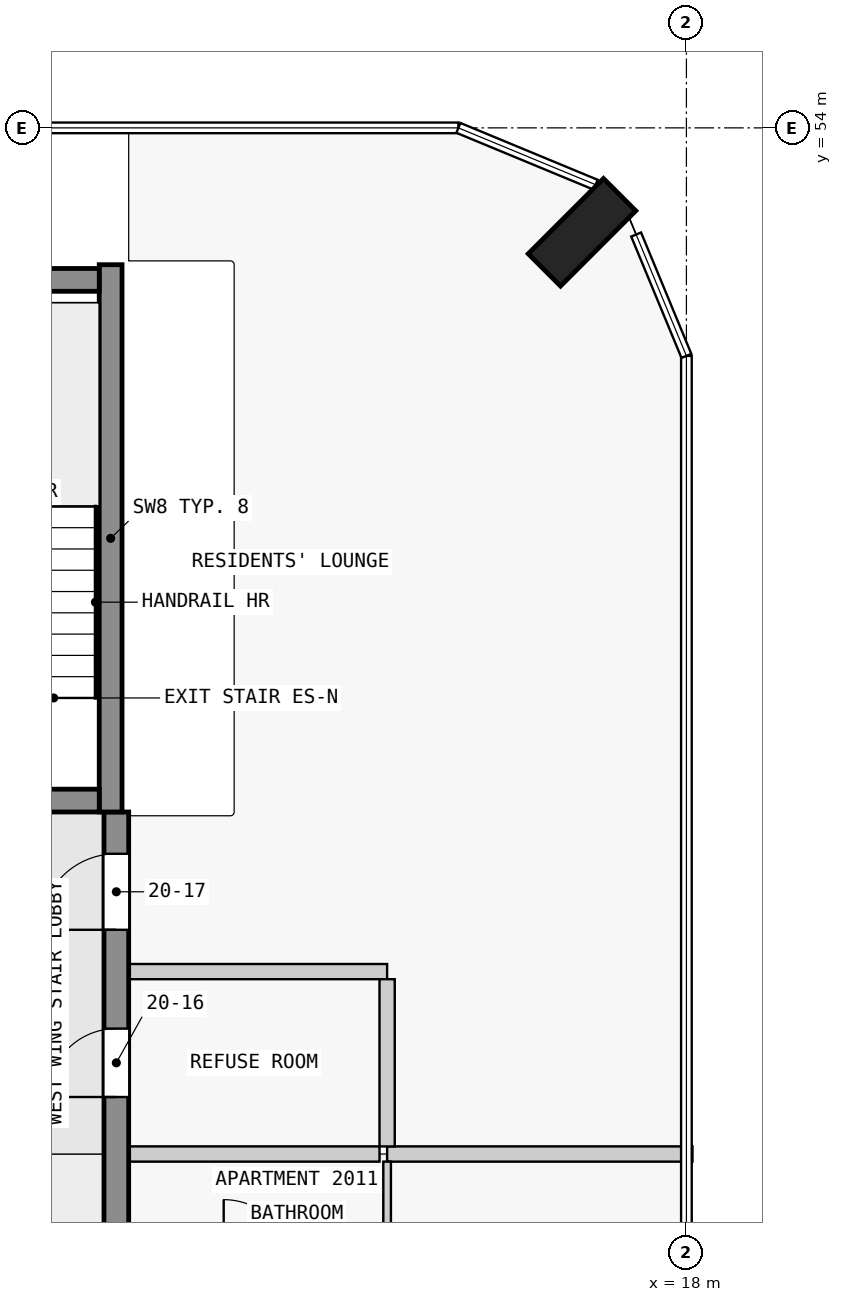
"""IFC4 building model, lengths in metres.
Left out: names, types, materials, properties, quantities, classifications, styles, units other than length and angle.
Written with IfcOpenShell. Run it as: python <this file> out.ifc"""

import sys

from ifc_helpers import new_model, si_unit, direction, frame, frame_2d, origin, origin_2d, place, context, subcontext, project, spatial, rectangle, extrude, element, fill, save


model = new_model("IFC4")
c1 = context("Model", 3, precision=1e-05, world=origin(), true_north=direction((0.0, 1.0)))
c2 = subcontext(c1, "Body", "Model", "MODEL_VIEW")
j1 = project(units=[si_unit("LENGTHUNIT", "METRE"), si_unit("PLANEANGLEUNIT", "RADIAN")], contexts=[c1])
p1 = place(None, origin())
s1 = spatial("IfcSite", under=j1, at=p1, CompositionType="ELEMENT")
p2 = place(p1, origin())
s2 = spatial("IfcBuilding", under=s1, at=p2, CompositionType="ELEMENT")
p3 = place(p2, frame((0.0, 0.0, 81.8)))
s3 = spatial("IfcBuildingStorey", under=s2, at=p3, CompositionType="ELEMENT", Elevation=81.8)
p4 = place(p3, frame((16.626, 52.626, 0.0), z_axis=(0.0, 0.0, 1.0), x_axis=(-0.707106781187, 0.707106781187, 0.0)))
e1 = element("IfcColumn", 1, at=p4, inside=s3, PredefinedType="COLUMN", context=c2, shape_type="SweptSolid", body=[
    extrude(rectangle(XDim=0.6, YDim=1.4, at=origin_2d()), origin(), (0.0, 0.0, 1.0), 3.5),
])
p5 = place(p3, frame((7.725, 45.15, 0.0), z_axis=(0.0, 0.0, 1.0), x_axis=(1.0, 0.0, 0.0)))
e2 = element("IfcWall", 2, at=p5, inside=s3, PredefinedType="SHEAR", context=c2, shape_type="SweptSolid", body=[
    extrude(rectangle(XDim=2.55, YDim=0.3, at=frame_2d((1.275, 0.0))), origin(), (0.0, 0.0, 1.0), 3.5),
])
p6 = place(p5, frame((0.725, 0.0, 0.0)))
e3 = element("IfcOpeningElement", 3, at=p6, cuts=e2, PredefinedType="OPENING", context=c2, shape_type="SweptSolid", body=[
    extrude(rectangle(XDim=1.1, YDim=2.1, at=frame_2d((0.55, 1.05))), frame((0.0, 0.16, 0.0), z_axis=(0.0, -1.0, 0.0), x_axis=(1.0, 0.0, 0.0)), (0.0, 0.0, 1.0), 0.32),
])
p7 = place(p3, frame((7.725, 52.0, 0.0), z_axis=(0.0, 0.0, 1.0), x_axis=(1.0, 0.0, 0.0)))
e4 = element("IfcWall", 4, at=p7, inside=s3, PredefinedType="SHEAR", context=c2, shape_type="SweptSolid", body=[
    extrude(rectangle(XDim=2.55, YDim=0.3, at=frame_2d((1.275, 0.0))), origin(), (0.0, 0.0, 1.0), 3.5),
])
p8 = place(p3, frame((10.425, 45.0, 0.0), z_axis=(0.0, 0.0, 1.0), x_axis=(0.0, 1.0, 0.0)))
e5 = element("IfcWall", 5, at=p8, inside=s3, PredefinedType="SHEAR", context=c2, shape_type="SweptSolid", body=[
    extrude(rectangle(XDim=7.2, YDim=0.3, at=frame_2d((3.6, 0.0))), origin(), (0.0, 0.0, 1.0), 3.5),
])
p9 = place(p3, frame((10.5, 18.0, 0.0), z_axis=(0.0, 0.0, 1.0), x_axis=(0.0, 1.0, 0.0)))
e6 = element("IfcWall", 6, at=p9, inside=s3, PredefinedType="SHEAR", context=c2, shape_type="SweptSolid", body=[
    extrude(rectangle(XDim=27.0, YDim=0.325, at=frame_2d((13.5, 0.0))), origin(), (0.0, 0.0, 1.0), 3.25),
])
p10 = place(p9, frame((4.05, 0.0, 0.0)))
e7 = element("IfcOpeningElement", 7, at=p10, cuts=e6, PredefinedType="OPENING", context=c2, shape_type="SweptSolid", body=[
    extrude(rectangle(XDim=1.0, YDim=2.1, at=frame_2d((0.5, 1.05))), frame((0.0, 0.172, 0.0), z_axis=(0.0, -1.0, 0.0), x_axis=(1.0, 0.0, 0.0)), (0.0, 0.0, 1.0), 0.345),
])
p11 = place(p9, frame((13.05, 0.0, 0.0)))
e8 = element("IfcOpeningElement", 8, at=p11, cuts=e6, PredefinedType="OPENING", context=c2, shape_type="SweptSolid", body=[
    extrude(rectangle(XDim=1.0, YDim=2.1, at=frame_2d((0.5, 1.05))), frame((0.0, 0.172, 0.0), z_axis=(0.0, -1.0, 0.0), x_axis=(1.0, 0.0, 0.0)), (0.0, 0.0, 1.0), 0.345),
])
p12 = place(p9, frame((19.75, 0.0, 0.0)))
e9 = element("IfcOpeningElement", 9, at=p12, cuts=e6, PredefinedType="OPENING", context=c2, shape_type="SweptSolid", body=[
    extrude(rectangle(XDim=1.0, YDim=2.1, at=frame_2d((0.5, 1.05))), frame((0.0, 0.172, 0.0), z_axis=(0.0, -1.0, 0.0), x_axis=(1.0, 0.0, 0.0)), (0.0, 0.0, 1.0), 0.345),
])
p13 = place(p9, frame((23.25, 0.0, 0.0)))
e10 = element("IfcOpeningElement", 10, at=p13, cuts=e6, PredefinedType="OPENING", context=c2, shape_type="SweptSolid", body=[
    extrude(rectangle(XDim=0.9, YDim=2.1, at=frame_2d((0.45, 1.05))), frame((0.0, 0.172, 0.0), z_axis=(0.0, -1.0, 0.0), x_axis=(1.0, 0.0, 0.0)), (0.0, 0.0, 1.0), 0.345),
])
p14 = place(p9, frame((25.45, 0.0, 0.0)))
e11 = element("IfcOpeningElement", 11, at=p14, cuts=e6, PredefinedType="OPENING", context=c2, shape_type="SweptSolid", body=[
    extrude(rectangle(XDim=1.0, YDim=2.1, at=frame_2d((0.5, 1.05))), frame((0.0, 0.172, 0.0), z_axis=(0.0, -1.0, 0.0), x_axis=(1.0, 0.0, 0.0)), (0.0, 0.0, 1.0), 0.345),
])
p15 = place(p3, frame((13.962, 40.5, 0.0), z_axis=(0.0, 0.0, 1.0), x_axis=(-1.0, 0.0, 0.0)))
e12 = element("IfcWall", 12, at=p15, inside=s3, PredefinedType="PARTITIONING", context=c2, shape_type="SweptSolid", body=[
    extrude(rectangle(XDim=3.3, YDim=0.2, at=frame_2d((1.65, 0.0))), origin(), (0.0, 0.0, 1.0), 3.25),
])
p16 = place(p3, frame((14.062, 40.5, 0.0), z_axis=(0.0, 0.0, 1.0), x_axis=(1.0, 0.0, 0.0)))
e13 = element("IfcWall", 13, at=p16, inside=s3, PredefinedType="PARTITIONING", context=c2, shape_type="SweptSolid", body=[
    extrude(rectangle(XDim=4.018, YDim=0.2, at=frame_2d((2.009, 0.0))), origin(), (0.0, 0.0, 1.0), 3.25),
])
p17 = place(p3, frame((14.062, 42.9, 0.0), z_axis=(0.0, 0.0, 1.0), x_axis=(-1.0, 0.0, 0.0)))
e14 = element("IfcWall", 14, at=p17, inside=s3, PredefinedType="PARTITIONING", context=c2, shape_type="SweptSolid", body=[
    extrude(rectangle(XDim=3.4, YDim=0.2, at=frame_2d((1.7, 0.0))), origin(), (0.0, 0.0, 1.0), 3.25),
])
p18 = place(p3, frame((14.062, 39.05, 0.0), z_axis=(0.0, 0.0, 1.0), x_axis=(0.0, 1.0, 0.0)))
e15 = element("IfcWall", 15, at=p18, inside=s3, PredefinedType="PARTITIONING", context=c2, shape_type="SweptSolid", body=[
    extrude(rectangle(XDim=1.35, YDim=0.1, at=frame_2d((0.675, 0.0))), origin(), (0.0, 0.0, 1.0), 3.25),
])
p19 = place(p3, frame((14.062, 40.6, 0.0), z_axis=(0.0, 0.0, 1.0), x_axis=(0.0, 1.0, 0.0)))
e16 = element("IfcWall", 16, at=p19, inside=s3, PredefinedType="PARTITIONING", context=c2, shape_type="SweptSolid", body=[
    extrude(rectangle(XDim=2.2, YDim=0.2, at=frame_2d((1.1, 0.0))), origin(), (0.0, 0.0, 1.0), 3.25),
])
p20 = place(p13, origin())
e17 = element("IfcDoor", 17, at=p20, inside=s3, OperationType="SINGLE_SWING_RIGHT", PredefinedType="DOOR", context=c2, shape_type="SweptSolid", body=[
    extrude(rectangle(XDim=0.9, YDim=2.1, at=frame_2d((0.45, 1.05))), frame((0.0, 0.025, 0.0), z_axis=(0.0, -1.0, 0.0), x_axis=(1.0, 0.0, 0.0)), (0.0, 0.0, 1.0), 0.05),
])
fill(e10, e17)
p21 = place(p14, origin())
e18 = element("IfcDoor", 18, at=p21, inside=s3, OperationType="SINGLE_SWING_RIGHT", PredefinedType="DOOR", context=c2, shape_type="SweptSolid", body=[
    extrude(rectangle(XDim=1.0, YDim=2.1, at=frame_2d((0.5, 1.05))), frame((0.0, 0.025, 0.0), z_axis=(0.0, -1.0, 0.0), x_axis=(1.0, 0.0, 0.0)), (0.0, 0.0, 1.0), 0.05),
])
fill(e11, e18)
save(model, sys.argv[1])
